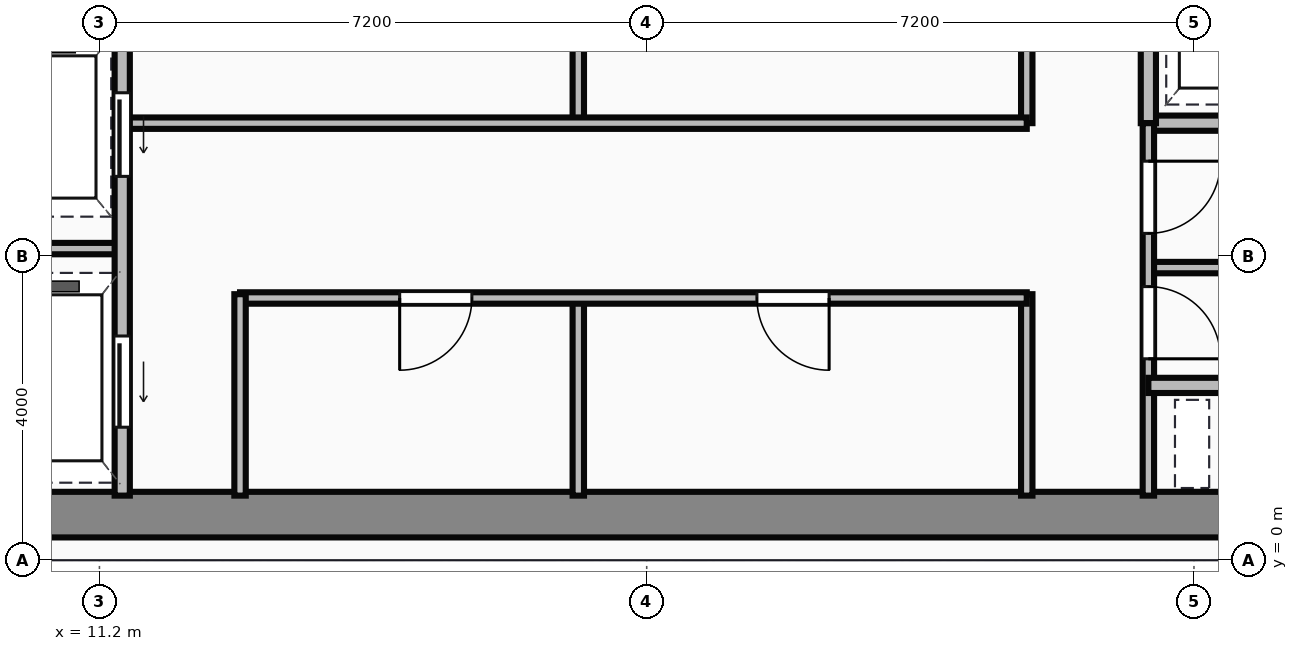
"""IFC4 building model, lengths in metres.
Left out: names, types, materials, properties, quantities, classifications, styles, units other than length and angle.
Written with IfcOpenShell. Run it as: python <this file> out.ifc"""

import sys

from ifc_helpers import new_model, si_unit, direction, frame, frame_2d, origin, place, context, subcontext, project, spatial, rectangle, extrude, source, transform, mapped, element, fill, save


model = new_model("IFC4")
c1 = context("Model", 3, precision=1e-05, world=origin(), true_north=direction((0.0, 1.0)))
c2 = subcontext(c1, "Body", "Model", "MODEL_VIEW")
j1 = project(units=[si_unit("LENGTHUNIT", "METRE"), si_unit("PLANEANGLEUNIT", "RADIAN")], contexts=[c1])
p1 = place(None, origin())
s1 = spatial("IfcSite", under=j1, at=p1, CompositionType="ELEMENT")
p2 = place(p1, origin())
s2 = spatial("IfcBuilding", under=s1, at=p2, CompositionType="ELEMENT")
p3 = place(p2, frame((0.0, 0.0, 280.7)))
s3 = spatial("IfcBuildingStorey", under=s2, at=p3, CompositionType="ELEMENT", Elevation=280.7)
m1 = source(origin(), c2, "Body", "SweptSolid", [
    extrude(rectangle(XDim=29.5, YDim=0.6, at=frame_2d((14.75, 0.0))), origin(), (0.0, 0.0, 1.0), 3.65),
])
p4 = place(p3, frame((4.5, 0.6, 0.0), z_axis=(0.0, 0.0, 1.0), x_axis=(1.0, 0.0, 0.0)))
e1 = element("IfcWall", 1, at=p4, inside=s3, PredefinedType="SHEAR", context=c2, shape_type="MappedRepresentation", body=[
    mapped(m1, transform((0.0, 0.0, 0.0))),
])
m2 = source(origin(), c2, "Body", "SweptSolid", [
    extrude(rectangle(XDim=9.6, YDim=0.2, at=frame_2d((4.8, 0.0))), origin(), (0.0, 0.0, 1.0), 3.4),
])
p5 = place(p3, frame((11.5, 0.85, 0.0), z_axis=(0.0, 0.0, 1.0), x_axis=(0.0, 1.0, 0.0)))
e2 = element("IfcWall", 2, at=p5, inside=s3, PredefinedType="PARTITIONING", context=c2, shape_type="MappedRepresentation", body=[
    mapped(m2, transform((0.0, 0.0, 0.0))),
])
p6 = place(p5, frame((4.2, 0.0, 0.0)))
e3 = element("IfcOpeningElement", 3, at=p6, cuts=e2, PredefinedType="OPENING", context=c2, shape_type="SweptSolid", body=[
    extrude(rectangle(XDim=1.1, YDim=2.15, at=frame_2d((0.55, 1.075))), frame((0.0, 0.11, 0.0), z_axis=(0.0, -1.0, 0.0), x_axis=(1.0, 0.0, 0.0)), (0.0, 0.0, 1.0), 0.22),
])
p7 = place(p5, frame((0.9, 0.0, 0.0)))
e4 = element("IfcOpeningElement", 4, at=p7, cuts=e2, PredefinedType="OPENING", context=c2, shape_type="SweptSolid", body=[
    extrude(rectangle(XDim=1.2, YDim=2.15, at=frame_2d((0.6, 1.075))), frame((0.0, 0.11, 0.0), z_axis=(0.0, -1.0, 0.0), x_axis=(1.0, 0.0, 0.0)), (0.0, 0.0, 1.0), 0.22),
])
m3 = source(origin(), c2, "Body", "SweptSolid", [
    extrude(rectangle(XDim=2.4, YDim=0.15, at=frame_2d((1.2, 0.0))), origin(), (0.0, 0.0, 1.0), 3.4),
])
p8 = place(p3, frame((9.1, 4.1, 0.0), z_axis=(0.0, 0.0, 1.0), x_axis=(1.0, 0.0, 0.0)))
e5 = element("IfcWall", 5, at=p8, inside=s3, PredefinedType="PARTITIONING", context=c2, shape_type="MappedRepresentation", body=[
    mapped(m3, transform((0.0, 0.0, 0.0))),
])
m4 = source(origin(), c2, "Body", "SweptSolid", [
    extrude(rectangle(XDim=2.65, YDim=0.15, at=frame_2d((1.325, 0.0))), origin(), (0.0, 0.0, 1.0), 3.4),
])
p9 = place(p3, frame((13.05, 0.85, 0.0), z_axis=(0.0, 0.0, 1.0), x_axis=(0.0, 1.0, 0.0)))
e6 = element("IfcWall", 6, at=p9, inside=s3, PredefinedType="PARTITIONING", context=c2, shape_type="MappedRepresentation", body=[
    mapped(m4, transform((0.0, 0.0, 0.0))),
])
m5 = source(origin(), c2, "Body", "SweptSolid", [
    extrude(rectangle(XDim=10.35, YDim=0.15, at=frame_2d((5.175, 0.0))), origin(), (0.0, 0.0, 1.0), 3.4),
])
p10 = place(p3, frame((13.05, 3.45, 0.0), z_axis=(0.0, 0.0, 1.0), x_axis=(1.0, 0.0, 0.0)))
e7 = element("IfcWall", 7, at=p10, inside=s3, PredefinedType="PARTITIONING", context=c2, shape_type="MappedRepresentation", body=[
    mapped(m5, transform((0.0, 0.0, 0.0))),
])
p11 = place(p10, frame((2.1, 0.0, 0.0)))
e8 = element("IfcOpeningElement", 8, at=p11, cuts=e7, PredefinedType="OPENING", context=c2, shape_type="SweptSolid", body=[
    extrude(rectangle(XDim=0.95, YDim=2.15, at=frame_2d((0.475, 1.075))), frame((0.0, 0.085, 0.0), z_axis=(0.0, -1.0, 0.0), x_axis=(1.0, 0.0, 0.0)), (0.0, 0.0, 1.0), 0.17),
])
p12 = place(p10, frame((6.8, 0.0, 0.0)))
e9 = element("IfcOpeningElement", 9, at=p12, cuts=e7, PredefinedType="OPENING", context=c2, shape_type="SweptSolid", body=[
    extrude(rectangle(XDim=0.95, YDim=2.15, at=frame_2d((0.475, 1.075))), frame((0.0, 0.085, 0.0), z_axis=(0.0, -1.0, 0.0), x_axis=(1.0, 0.0, 0.0)), (0.0, 0.0, 1.0), 0.17),
])
p13 = place(p3, frame((23.4, 0.85, 0.0), z_axis=(0.0, 0.0, 1.0), x_axis=(0.0, 1.0, 0.0)))
e10 = element("IfcWall", 10, at=p13, inside=s3, PredefinedType="PARTITIONING", context=c2, shape_type="MappedRepresentation", body=[
    mapped(m4, transform((0.0, 0.0, 0.0))),
])
m6 = source(origin(), c2, "Body", "SweptSolid", [
    extrude(rectangle(XDim=2.6, YDim=0.15, at=frame_2d((1.3, 0.0))), origin(), (0.0, 0.0, 1.0), 3.4),
])
p14 = place(p3, frame((17.5, 0.85, 0.0), z_axis=(0.0, 0.0, 1.0), x_axis=(0.0, 1.0, 0.0)))
e11 = element("IfcWall", 11, at=p14, inside=s3, PredefinedType="PARTITIONING", context=c2, shape_type="MappedRepresentation", body=[
    mapped(m6, transform((0.0, 0.0, 0.0))),
])
m7 = source(origin(), c2, "Body", "SweptSolid", [
    extrude(rectangle(XDim=11.85, YDim=0.15, at=frame_2d((5.925, 0.0))), origin(), (0.0, 0.0, 1.0), 3.4),
])
p15 = place(p3, frame((11.55, 5.75, 0.0), z_axis=(0.0, 0.0, 1.0), x_axis=(1.0, 0.0, 0.0)))
e12 = element("IfcWall", 12, at=p15, inside=s3, PredefinedType="PARTITIONING", context=c2, shape_type="MappedRepresentation", body=[
    mapped(m7, transform((0.0, 0.0, 0.0))),
])
m8 = source(origin(), c2, "Body", "SweptSolid", [
    extrude(rectangle(XDim=2.6, YDim=0.15, at=frame_2d((1.3, 0.0))), origin(), (0.0, 0.0, 1.0), 3.4),
])
p16 = place(p3, frame((23.4, 5.75, 0.0), z_axis=(0.0, 0.0, 1.0), x_axis=(0.0, 1.0, 0.0)))
e13 = element("IfcWall", 13, at=p16, inside=s3, PredefinedType="PARTITIONING", context=c2, shape_type="MappedRepresentation", body=[
    mapped(m8, transform((0.0, 0.0, 0.0))),
])
m9 = source(origin(), c2, "Body", "SweptSolid", [
    extrude(rectangle(XDim=2.5, YDim=0.15, at=frame_2d((1.25, 0.0))), origin(), (0.0, 0.0, 1.0), 3.4),
])
p17 = place(p3, frame((17.5, 5.8, 0.0), z_axis=(0.0, 0.0, 1.0), x_axis=(0.0, 1.0, 0.0)))
e14 = element("IfcWall", 14, at=p17, inside=s3, PredefinedType="PARTITIONING", context=c2, shape_type="MappedRepresentation", body=[
    mapped(m9, transform((0.0, 0.0, 0.0))),
])
m10 = source(origin(), c2, "Body", "SweptSolid", [
    extrude(rectangle(XDim=4.55, YDim=0.2, at=frame_2d((2.275, 0.0))), origin(), (0.0, 0.0, 1.0), 3.4),
])
p18 = place(p3, frame((25.0, 5.75, 0.0), z_axis=(0.0, 0.0, 1.0), x_axis=(1.0, 0.0, 0.0)))
e15 = element("IfcWall", 15, at=p18, inside=s3, PredefinedType="PARTITIONING", context=c2, shape_type="MappedRepresentation", body=[
    mapped(m10, transform((0.0, 0.0, 0.0))),
])
m11 = source(origin(), c2, "Body", "SweptSolid", [
    extrude(rectangle(XDim=2.6, YDim=0.2, at=frame_2d((1.3, 0.0))), origin(), (0.0, 0.0, 1.0), 3.4),
])
p19 = place(p3, frame((25.0, 5.75, 0.0), z_axis=(0.0, 0.0, 1.0), x_axis=(0.0, 1.0, 0.0)))
e16 = element("IfcWall", 16, at=p19, inside=s3, PredefinedType="PARTITIONING", context=c2, shape_type="MappedRepresentation", body=[
    mapped(m11, transform((0.0, 0.0, 0.0))),
])
m12 = source(origin(), c2, "Body", "SweptSolid", [
    extrude(rectangle(XDim=4.9, YDim=0.15, at=frame_2d((2.45, 0.0))), origin(), (0.0, 0.0, 1.0), 3.4),
])
p20 = place(p3, frame((25.0, 0.85, 0.0), z_axis=(0.0, 0.0, 1.0), x_axis=(0.0, 1.0, 0.0)))
e17 = element("IfcWall", 17, at=p20, inside=s3, PredefinedType="PARTITIONING", context=c2, shape_type="MappedRepresentation", body=[
    mapped(m12, transform((0.0, 0.0, 0.0))),
])
p21 = place(p20, frame((1.8, 0.0, 0.0)))
e18 = element("IfcOpeningElement", 18, at=p21, cuts=e17, PredefinedType="OPENING", context=c2, shape_type="SweptSolid", body=[
    extrude(rectangle(XDim=0.95, YDim=2.15, at=frame_2d((0.475, 1.075))), frame((0.0, 0.085, 0.0), z_axis=(0.0, -1.0, 0.0), x_axis=(1.0, 0.0, 0.0)), (0.0, 0.0, 1.0), 0.17),
])
p22 = place(p20, frame((3.45, 0.0, 0.0)))
e19 = element("IfcOpeningElement", 19, at=p22, cuts=e17, PredefinedType="OPENING", context=c2, shape_type="SweptSolid", body=[
    extrude(rectangle(XDim=0.95, YDim=2.15, at=frame_2d((0.475, 1.075))), frame((0.0, 0.085, 0.0), z_axis=(0.0, -1.0, 0.0), x_axis=(1.0, 0.0, 0.0)), (0.0, 0.0, 1.0), 0.17),
])
m13 = source(origin(), c2, "Body", "SweptSolid", [
    extrude(rectangle(XDim=2.4, YDim=0.2, at=frame_2d((1.2, 0.0))), origin(), (0.0, 0.0, 1.0), 3.4),
])
p23 = place(p3, frame((25.0, 2.3, 0.0), z_axis=(0.0, 0.0, 1.0), x_axis=(1.0, 0.0, 0.0)))
e20 = element("IfcWall", 20, at=p23, inside=s3, PredefinedType="PARTITIONING", context=c2, shape_type="MappedRepresentation", body=[
    mapped(m13, transform((0.0, 0.0, 0.0))),
])
m14 = source(origin(), c2, "Body", "SweptSolid", [
    extrude(rectangle(XDim=4.55, YDim=0.15, at=frame_2d((2.275, 0.0))), origin(), (0.0, 0.0, 1.0), 3.4),
])
p24 = place(p3, frame((25.0, 3.85, 0.0), z_axis=(0.0, 0.0, 1.0), x_axis=(1.0, 0.0, 0.0)))
e21 = element("IfcWall", 21, at=p24, inside=s3, PredefinedType="PARTITIONING", context=c2, shape_type="MappedRepresentation", body=[
    mapped(m14, transform((0.0, 0.0, 0.0))),
])
m15 = source(origin(), c2, "Body", "SweptSolid", [
    extrude(rectangle(XDim=1.1, YDim=2.15, at=frame_2d((0.55, 1.075))), frame((0.0, 0.025, 0.0), z_axis=(0.0, -1.0, 0.0), x_axis=(1.0, 0.0, 0.0)), (0.0, 0.0, 1.0), 0.05),
])
p25 = place(p6, frame((1.1, 0.0, 0.0), z_axis=(0.0, 0.0, 1.0), x_axis=(-1.0, 0.0, 0.0)))
e22 = element("IfcDoor", 22, at=p25, inside=s3, OperationType="SLIDING_TO_LEFT", PredefinedType="DOOR", context=c2, shape_type="MappedRepresentation", body=[
    mapped(m15, transform((0.0, 0.0, 0.0))),
])
fill(e3, e22)
m16 = source(origin(), c2, "Body", "SweptSolid", [
    extrude(rectangle(XDim=1.2, YDim=2.15, at=frame_2d((0.6, 1.075))), frame((0.0, 0.025, 0.0), z_axis=(0.0, -1.0, 0.0), x_axis=(1.0, 0.0, 0.0)), (0.0, 0.0, 1.0), 0.05),
])
p26 = place(p7, frame((1.2, 0.0, 0.0), z_axis=(0.0, 0.0, 1.0), x_axis=(-1.0, 0.0, 0.0)))
e23 = element("IfcDoor", 23, at=p26, inside=s3, OperationType="SLIDING_TO_LEFT", PredefinedType="DOOR", context=c2, shape_type="MappedRepresentation", body=[
    mapped(m16, transform((0.0, 0.0, 0.0))),
])
fill(e4, e23)
m17 = source(origin(), c2, "Body", "SweptSolid", [
    extrude(rectangle(XDim=0.95, YDim=2.15, at=frame_2d((0.475, 1.075))), frame((0.0, 0.025, 0.0), z_axis=(0.0, -1.0, 0.0), x_axis=(1.0, 0.0, 0.0)), (0.0, 0.0, 1.0), 0.05),
])
p27 = place(p11, origin())
e24 = element("IfcDoor", 24, at=p27, inside=s3, OperationType="SINGLE_SWING_LEFT", PredefinedType="DOOR", context=c2, shape_type="MappedRepresentation", body=[
    mapped(m17, transform((0.0, 0.0, 0.0))),
])
fill(e8, e24)
p28 = place(p12, origin())
e25 = element("IfcDoor", 25, at=p28, inside=s3, OperationType="SINGLE_SWING_RIGHT", PredefinedType="DOOR", context=c2, shape_type="MappedRepresentation", body=[
    mapped(m17, transform((0.0, 0.0, 0.0))),
])
fill(e9, e25)
p29 = place(p21, origin())
e26 = element("IfcDoor", 26, at=p29, inside=s3, OperationType="SINGLE_SWING_LEFT", PredefinedType="DOOR", context=c2, shape_type="MappedRepresentation", body=[
    mapped(m17, transform((0.0, 0.0, 0.0))),
])
fill(e18, e26)
p30 = place(p22, origin())
e27 = element("IfcDoor", 27, at=p30, inside=s3, OperationType="SINGLE_SWING_RIGHT", PredefinedType="DOOR", context=c2, shape_type="MappedRepresentation", body=[
    mapped(m17, transform((0.0, 0.0, 0.0))),
])
fill(e19, e27)
save(model, sys.argv[1])
